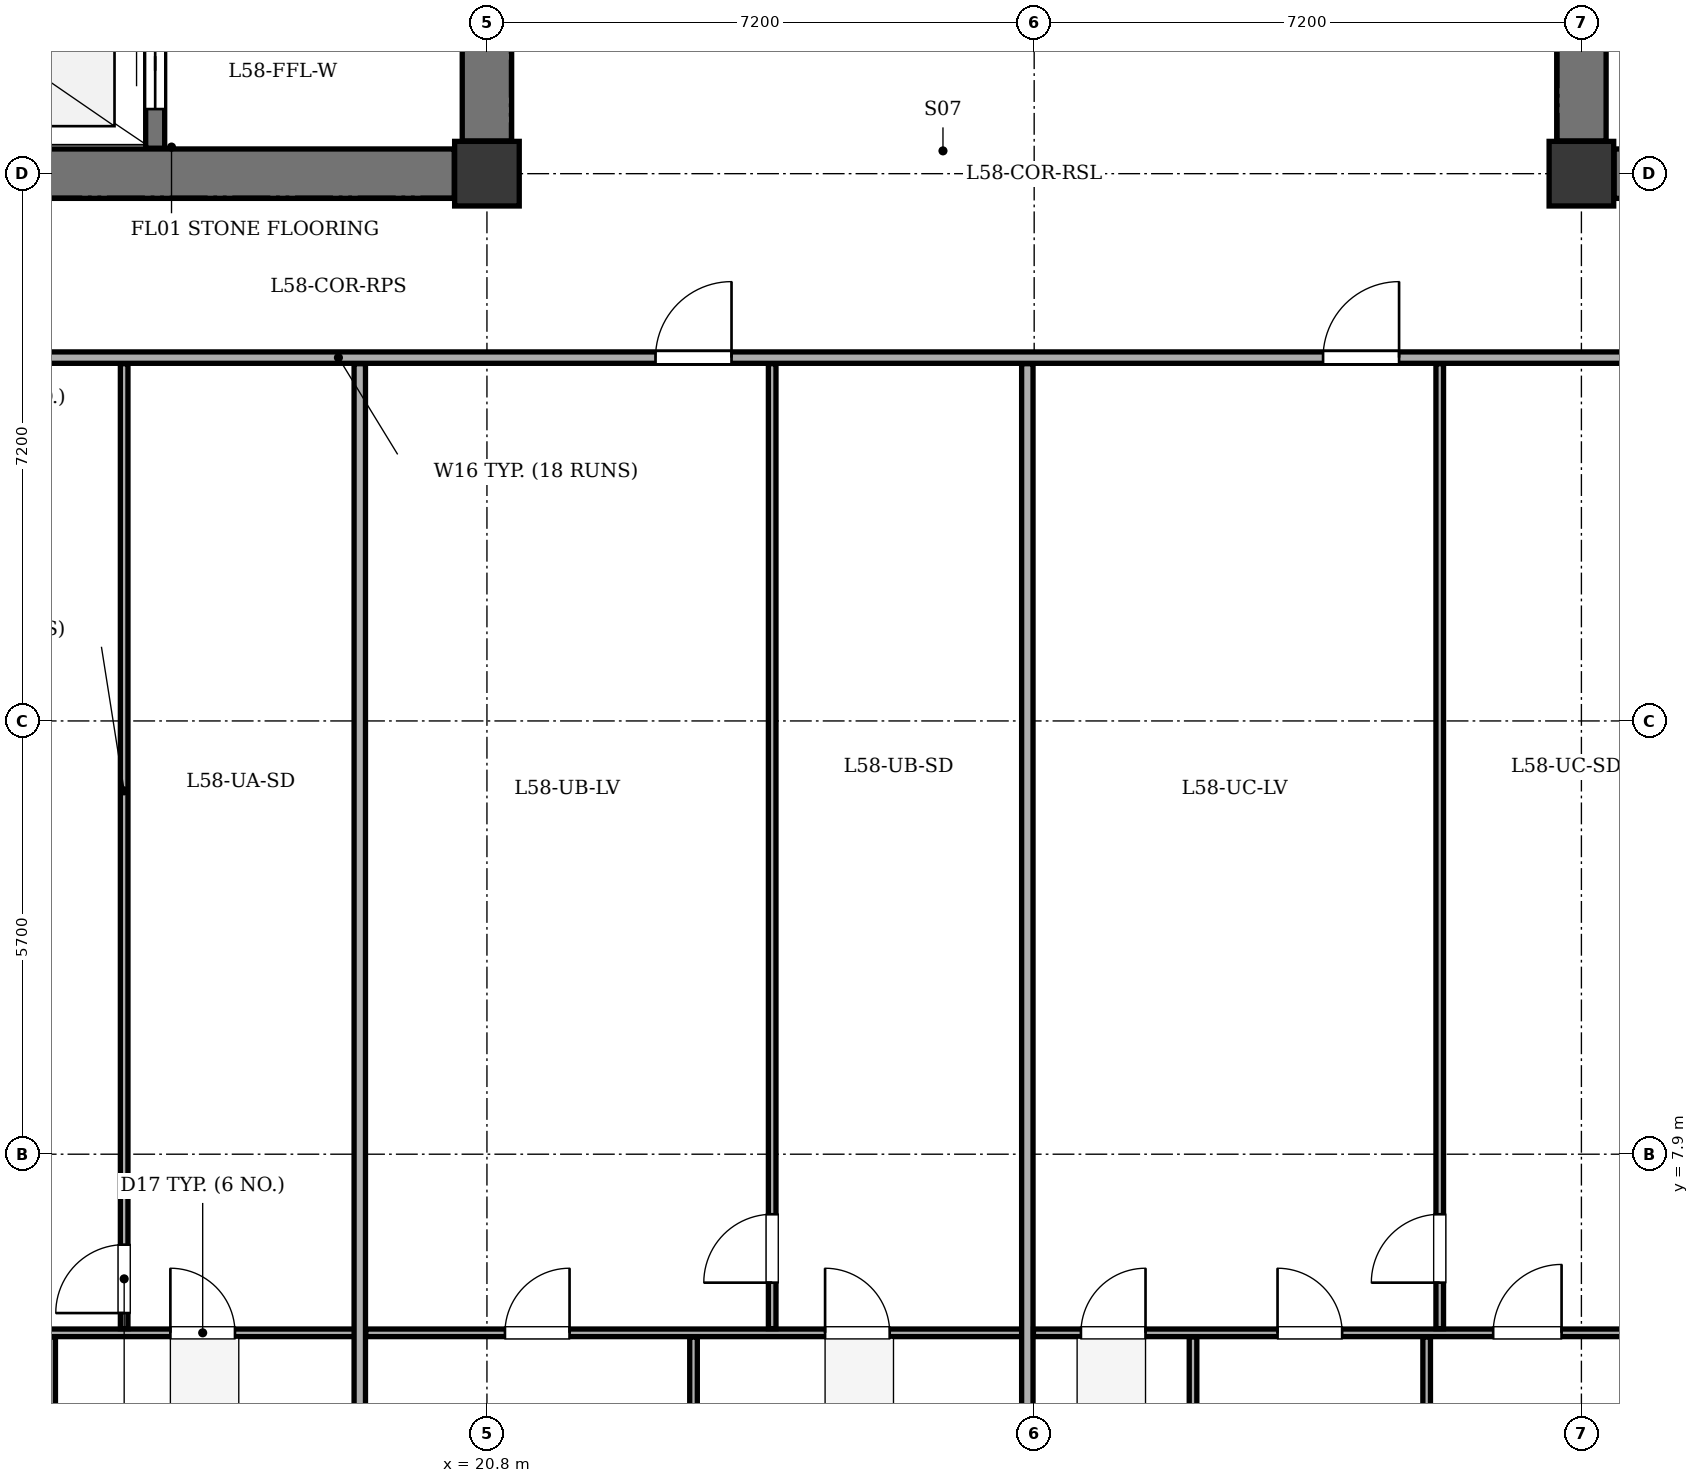
"""IFC4 building model, lengths in metres.
Left out: names, types, materials, properties, quantities, classifications, styles, units other than length and angle.
Written with IfcOpenShell. Run it as: python <this file> out.ifc"""

import sys

from ifc_helpers import new_model, si_unit, direction, frame, frame_2d, origin, origin_2d, place, context, subcontext, project, spatial, rectangle, extrude, element, fill, save


model = new_model("IFC4")
c1 = context("Model", 3, precision=1e-05, world=origin(), true_north=direction((0.0, 1.0)))
c2 = subcontext(c1, "Body", "Model", "MODEL_VIEW")
j1 = project(units=[si_unit("LENGTHUNIT", "METRE"), si_unit("PLANEANGLEUNIT", "RADIAN")], contexts=[c1])
p1 = place(None, origin())
s1 = spatial("IfcSite", under=j1, at=p1, CompositionType="ELEMENT")
p2 = place(p1, origin())
s2 = spatial("IfcBuilding", under=s1, at=p2, CompositionType="ELEMENT")
p3 = place(p2, frame((0.0, 0.0, 224.5)))
s3 = spatial("IfcBuildingStorey", under=s2, at=p3, CompositionType="ELEMENT", Elevation=224.5)
for number, where, z_axis, x_axis in (
    (1, (20.8, 20.8, 0.0), (0.0, 0.0, 1.0), (1.0, 0.0, 0.0)),
    (2, (35.2, 20.8, 0.0), (0.0, 0.0, 1.0), (1.0, 0.0, 0.0)),
):
    element("IfcColumn", number, at=place(p3, frame(where, z_axis=z_axis, x_axis=x_axis)), inside=s3, PredefinedType="COLUMN", context=c2, shape_type="SweptSolid", body=[
        extrude(rectangle(XDim=0.85, YDim=0.85, at=origin_2d()), origin(), (0.0, 0.0, 1.0), 3.4),
    ])
p4 = place(p3, frame((13.23, 20.8, 0.0), z_axis=(0.0, 0.0, 1.0), x_axis=(1.0, 0.0, 0.0)))
e3 = element("IfcWall", 3, at=p4, inside=s3, PredefinedType="SHEAR", context=c2, shape_type="SweptSolid", body=[
    extrude(rectangle(XDim=7.14, YDim=0.65, at=frame_2d((3.57, 0.0))), origin(), (0.0, 0.0, 1.0), 2.95),
])
p5 = place(p3, frame((20.8, 21.23, 0.0), z_axis=(0.0, 0.0, 1.0), x_axis=(0.0, 1.0, 0.0)))
e4 = element("IfcWall", 4, at=p5, inside=s3, PredefinedType="SHEAR", context=c2, shape_type="SweptSolid", body=[
    extrude(rectangle(XDim=3.82, YDim=0.65, at=frame_2d((1.91, 0.0))), origin(), (0.0, 0.0, 1.0), 2.95),
])
p6 = place(p5, frame((1.37, 0.0, 0.0)))
e5 = element("IfcOpeningElement", 5, at=p6, cuts=e4, PredefinedType="OPENING", context=c2, shape_type="SweptSolid", body=[
    extrude(rectangle(XDim=1.2, YDim=2.15, at=frame_2d((0.6, 1.075))), frame((0.0, 0.335, 0.0), z_axis=(0.0, -1.0, 0.0), x_axis=(1.0, 0.0, 0.0)), (0.0, 0.0, 1.0), 0.67),
])
p7 = place(p3, frame((16.435, 21.135, 0.0), z_axis=(0.0, 0.0, 1.0), x_axis=(0.0, 1.0, 0.0)))
e6 = element("IfcWall", 6, at=p7, inside=s3, PredefinedType="SHEAR", context=c2, shape_type="SweptSolid", body=[
    extrude(rectangle(XDim=12.13, YDim=0.25, at=frame_2d((6.065, 0.0))), origin(), (0.0, 0.0, 1.0), 2.95),
])
p8 = place(p7, frame((0.515, 0.0, 0.0)))
e7 = element("IfcOpeningElement", 7, at=p8, cuts=e6, PredefinedType="OPENING", context=c2, shape_type="SweptSolid", body=[
    extrude(rectangle(XDim=1.2, YDim=2.15, at=frame_2d((0.6, 1.075))), frame((0.0, 0.135, 0.0), z_axis=(0.0, -1.0, 0.0), x_axis=(1.0, 0.0, 0.0)), (0.0, 0.0, 1.0), 0.27),
])
p9 = place(p7, frame((2.665, 0.0, 0.0)))
e8 = element("IfcOpeningElement", 8, at=p9, cuts=e6, PredefinedType="OPENING", context=c2, shape_type="SweptSolid", body=[
    extrude(rectangle(XDim=1.15, YDim=2.15, at=frame_2d((0.575, 1.075))), frame((0.0, 0.135, 0.0), z_axis=(0.0, -1.0, 0.0), x_axis=(1.0, 0.0, 0.0)), (0.0, 0.0, 1.0), 0.27),
])
p10 = place(p3, frame((35.63, 20.8, 0.0), z_axis=(0.0, 0.0, 1.0), x_axis=(1.0, 0.0, 0.0)))
e9 = element("IfcWall", 9, at=p10, inside=s3, PredefinedType="SHEAR", context=c2, shape_type="SweptSolid", body=[
    extrude(rectangle(XDim=7.14, YDim=0.65, at=frame_2d((3.57, 0.0))), origin(), (0.0, 0.0, 1.0), 2.95),
])
p11 = place(p3, frame((35.2, 21.23, 0.0), z_axis=(0.0, 0.0, 1.0), x_axis=(0.0, 1.0, 0.0)))
e10 = element("IfcWall", 10, at=p11, inside=s3, PredefinedType="SHEAR", context=c2, shape_type="SweptSolid", body=[
    extrude(rectangle(XDim=3.82, YDim=0.65, at=frame_2d((1.91, 0.0))), origin(), (0.0, 0.0, 1.0), 2.95),
])
p12 = place(p11, frame((1.37, 0.0, 0.0)))
e11 = element("IfcOpeningElement", 11, at=p12, cuts=e10, PredefinedType="OPENING", context=c2, shape_type="SweptSolid", body=[
    extrude(rectangle(XDim=1.2, YDim=2.15, at=frame_2d((0.6, 1.075))), frame((0.0, 0.335, 0.0), z_axis=(0.0, -1.0, 0.0), x_axis=(1.0, 0.0, 0.0)), (0.0, 0.0, 1.0), 0.67),
])
p13 = place(p3, frame((10.9, 18.38, 0.0), z_axis=(0.0, 0.0, 1.0), x_axis=(1.0, 0.0, 0.0)))
e12 = element("IfcWall", 12, at=p13, inside=s3, PredefinedType="PARTITIONING", context=c2, shape_type="SweptSolid", body=[
    extrude(rectangle(XDim=34.02, YDim=0.15, at=frame_2d((17.01, 0.0))), origin(), (0.0, 0.0, 1.0), 2.95),
])
p14 = place(p13, frame((2.774, 0.0, 0.0)))
e13 = element("IfcOpeningElement", 13, at=p14, cuts=e12, PredefinedType="OPENING", context=c2, shape_type="SweptSolid", body=[
    extrude(rectangle(XDim=1.0, YDim=2.1, at=frame_2d((0.5, 1.05))), frame((0.0, 0.085, 0.0), z_axis=(0.0, -1.0, 0.0), x_axis=(1.0, 0.0, 0.0)), (0.0, 0.0, 1.0), 0.17),
])
p15 = place(p13, frame((12.118, 0.0, 0.0)))
e14 = element("IfcOpeningElement", 14, at=p15, cuts=e12, PredefinedType="OPENING", context=c2, shape_type="SweptSolid", body=[
    extrude(rectangle(XDim=1.0, YDim=2.1, at=frame_2d((0.5, 1.05))), frame((0.0, 0.085, 0.0), z_axis=(0.0, -1.0, 0.0), x_axis=(1.0, 0.0, 0.0)), (0.0, 0.0, 1.0), 0.17),
])
p16 = place(p13, frame((20.901, 0.0, 0.0)))
e15 = element("IfcOpeningElement", 15, at=p16, cuts=e12, PredefinedType="OPENING", context=c2, shape_type="SweptSolid", body=[
    extrude(rectangle(XDim=1.0, YDim=2.1, at=frame_2d((0.5, 1.05))), frame((0.0, 0.085, 0.0), z_axis=(0.0, -1.0, 0.0), x_axis=(1.0, 0.0, 0.0)), (0.0, 0.0, 1.0), 0.17),
])
p17 = place(p13, frame((29.346, 0.0, 0.0)))
e16 = element("IfcOpeningElement", 16, at=p17, cuts=e12, PredefinedType="OPENING", context=c2, shape_type="SweptSolid", body=[
    extrude(rectangle(XDim=1.0, YDim=2.1, at=frame_2d((0.5, 1.05))), frame((0.0, 0.085, 0.0), z_axis=(0.0, -1.0, 0.0), x_axis=(1.0, 0.0, 0.0)), (0.0, 0.0, 1.0), 0.17),
])
p18 = place(p3, frame((11.1, 5.55, 0.0), z_axis=(0.0, 0.0, 1.0), x_axis=(1.0, 0.0, 0.0)))
e17 = element("IfcWall", 17, at=p18, inside=s3, PredefinedType="PARTITIONING", context=c2, shape_type="SweptSolid", body=[
    extrude(rectangle(XDim=8.067, YDim=0.1, at=frame_2d((4.033, 0.0))), origin(), (0.0, 0.0, 1.0), 2.95),
])
p19 = place(p18, frame((1.562, 0.0, 0.0)))
e18 = element("IfcOpeningElement", 18, at=p19, cuts=e17, PredefinedType="OPENING", context=c2, shape_type="SweptSolid", body=[
    extrude(rectangle(XDim=0.85, YDim=2.05, at=frame_2d((0.425, 1.025))), frame((0.0, 0.06, 0.0), z_axis=(0.0, -1.0, 0.0), x_axis=(1.0, 0.0, 0.0)), (0.0, 0.0, 1.0), 0.12),
])
p20 = place(p18, frame((5.535, 0.0, 0.0)))
e19 = element("IfcOpeningElement", 19, at=p20, cuts=e17, PredefinedType="OPENING", context=c2, shape_type="SweptSolid", body=[
    extrude(rectangle(XDim=0.85, YDim=2.05, at=frame_2d((0.425, 1.025))), frame((0.0, 0.06, 0.0), z_axis=(0.0, -1.0, 0.0), x_axis=(1.0, 0.0, 0.0)), (0.0, 0.0, 1.0), 0.12),
])
p21 = place(p3, frame((16.027, 5.605, 0.0), z_axis=(0.0, 0.0, 1.0), x_axis=(0.0, 1.0, 0.0)))
e20 = element("IfcWall", 20, at=p21, inside=s3, PredefinedType="PARTITIONING", context=c2, shape_type="SweptSolid", body=[
    extrude(rectangle(XDim=12.695, YDim=0.1, at=frame_2d((6.348, 0.0))), origin(), (0.0, 0.0, 1.0), 2.95),
])
p22 = place(p21, frame((0.205, 0.0, 0.0)))
e21 = element("IfcOpeningElement", 21, at=p22, cuts=e20, PredefinedType="OPENING", context=c2, shape_type="SweptSolid", body=[
    extrude(rectangle(XDim=0.9, YDim=2.05, at=frame_2d((0.45, 1.025))), frame((0.0, 0.06, 0.0), z_axis=(0.0, -1.0, 0.0), x_axis=(1.0, 0.0, 0.0)), (0.0, 0.0, 1.0), 0.12),
])
p23 = place(p3, frame((15.073, 3.045, 0.0), z_axis=(0.0, 0.0, 1.0), x_axis=(0.0, 1.0, 0.0)))
e22 = element("IfcWall", 22, at=p23, inside=s3, PredefinedType="PARTITIONING", context=c2, shape_type="SweptSolid", body=[
    extrude(rectangle(XDim=2.45, YDim=0.1, at=frame_2d((1.225, 0.0))), origin(), (0.0, 0.0, 1.0), 1.535),
])
p24 = place(p3, frame((19.127, 3.045, 0.0), z_axis=(0.0, 0.0, 1.0), x_axis=(0.0, 1.0, 0.0)))
e23 = element("IfcWall", 23, at=p24, inside=s3, PredefinedType="PARTITIONING", context=c2, shape_type="SweptSolid", body=[
    extrude(rectangle(XDim=15.255, YDim=0.15, at=frame_2d((7.627, 0.0))), origin(), (0.0, 0.0, 1.0), 2.95),
])
p25 = place(p3, frame((19.207, 5.55, 0.0), z_axis=(0.0, 0.0, 1.0), x_axis=(1.0, 0.0, 0.0)))
e24 = element("IfcWall", 24, at=p25, inside=s3, PredefinedType="PARTITIONING", context=c2, shape_type="SweptSolid", body=[
    extrude(rectangle(XDim=8.743, YDim=0.1, at=frame_2d((4.372, 0.0))), origin(), (0.0, 0.0, 1.0), 2.95),
])
p26 = place(p25, frame((1.83, 0.0, 0.0)))
e25 = element("IfcOpeningElement", 25, at=p26, cuts=e24, PredefinedType="OPENING", context=c2, shape_type="SweptSolid", body=[
    extrude(rectangle(XDim=0.85, YDim=2.05, at=frame_2d((0.425, 1.025))), frame((0.0, 0.06, 0.0), z_axis=(0.0, -1.0, 0.0), x_axis=(1.0, 0.0, 0.0)), (0.0, 0.0, 1.0), 0.12),
])
p27 = place(p25, frame((6.042, 0.0, 0.0)))
e26 = element("IfcOpeningElement", 26, at=p27, cuts=e24, PredefinedType="OPENING", context=c2, shape_type="SweptSolid", body=[
    extrude(rectangle(XDim=0.85, YDim=2.05, at=frame_2d((0.425, 1.025))), frame((0.0, 0.06, 0.0), z_axis=(0.0, -1.0, 0.0), x_axis=(1.0, 0.0, 0.0)), (0.0, 0.0, 1.0), 0.12),
])
p28 = place(p3, frame((24.553, 5.605, 0.0), z_axis=(0.0, 0.0, 1.0), x_axis=(0.0, 1.0, 0.0)))
e27 = element("IfcWall", 27, at=p28, inside=s3, PredefinedType="PARTITIONING", context=c2, shape_type="SweptSolid", body=[
    extrude(rectangle(XDim=12.695, YDim=0.1, at=frame_2d((6.348, 0.0))), origin(), (0.0, 0.0, 1.0), 2.95),
])
p29 = place(p28, frame((0.605, 0.0, 0.0)))
e28 = element("IfcOpeningElement", 28, at=p29, cuts=e27, PredefinedType="OPENING", context=c2, shape_type="SweptSolid", body=[
    extrude(rectangle(XDim=0.9, YDim=2.05, at=frame_2d((0.45, 1.025))), frame((0.0, 0.06, 0.0), z_axis=(0.0, -1.0, 0.0), x_axis=(1.0, 0.0, 0.0)), (0.0, 0.0, 1.0), 0.12),
])
p30 = place(p3, frame((23.518, 3.045, 0.0), z_axis=(0.0, 0.0, 1.0), x_axis=(0.0, 1.0, 0.0)))
e29 = element("IfcWall", 29, at=p30, inside=s3, PredefinedType="PARTITIONING", context=c2, shape_type="SweptSolid", body=[
    extrude(rectangle(XDim=2.45, YDim=0.1, at=frame_2d((1.225, 0.0))), origin(), (0.0, 0.0, 1.0), 2.95),
])
p31 = place(p3, frame((27.91, 3.045, 0.0), z_axis=(0.0, 0.0, 1.0), x_axis=(0.0, 1.0, 0.0)))
e30 = element("IfcWall", 30, at=p31, inside=s3, PredefinedType="PARTITIONING", context=c2, shape_type="SweptSolid", body=[
    extrude(rectangle(XDim=15.255, YDim=0.15, at=frame_2d((7.627, 0.0))), origin(), (0.0, 0.0, 1.0), 2.135),
])
p32 = place(p3, frame((27.99, 5.55, 0.0), z_axis=(0.0, 0.0, 1.0), x_axis=(1.0, 0.0, 0.0)))
e31 = element("IfcWall", 31, at=p32, inside=s3, PredefinedType="PARTITIONING", context=c2, shape_type="SweptSolid", body=[
    extrude(rectangle(XDim=8.743, YDim=0.1, at=frame_2d((4.372, 0.0))), origin(), (0.0, 0.0, 1.0), 2.95),
])
p33 = place(p32, frame((0.625, 0.0, 0.0)))
e32 = element("IfcOpeningElement", 32, at=p33, cuts=e31, PredefinedType="OPENING", context=c2, shape_type="SweptSolid", body=[
    extrude(rectangle(XDim=0.85, YDim=2.05, at=frame_2d((0.425, 1.025))), frame((0.0, 0.06, 0.0), z_axis=(0.0, -1.0, 0.0), x_axis=(1.0, 0.0, 0.0)), (0.0, 0.0, 1.0), 0.12),
])
p34 = place(p32, frame((3.212, 0.0, 0.0)))
e33 = element("IfcOpeningElement", 33, at=p34, cuts=e31, PredefinedType="OPENING", context=c2, shape_type="SweptSolid", body=[
    extrude(rectangle(XDim=0.85, YDim=2.05, at=frame_2d((0.425, 1.025))), frame((0.0, 0.06, 0.0), z_axis=(0.0, -1.0, 0.0), x_axis=(1.0, 0.0, 0.0)), (0.0, 0.0, 1.0), 0.12),
])
p35 = place(p32, frame((6.049, 0.0, 0.0)))
e34 = element("IfcOpeningElement", 34, at=p35, cuts=e31, PredefinedType="OPENING", context=c2, shape_type="SweptSolid", body=[
    extrude(rectangle(XDim=0.9, YDim=2.05, at=frame_2d((0.45, 1.025))), frame((0.0, 0.06, 0.0), z_axis=(0.0, -1.0, 0.0), x_axis=(1.0, 0.0, 0.0)), (0.0, 0.0, 1.0), 0.12),
])
p36 = place(p3, frame((33.336, 5.605, 0.0), z_axis=(0.0, 0.0, 1.0), x_axis=(0.0, 1.0, 0.0)))
e35 = element("IfcWall", 35, at=p36, inside=s3, PredefinedType="PARTITIONING", context=c2, shape_type="SweptSolid", body=[
    extrude(rectangle(XDim=12.695, YDim=0.1, at=frame_2d((6.348, 0.0))), origin(), (0.0, 0.0, 1.0), 2.95),
])
p37 = place(p36, frame((0.605, 0.0, 0.0)))
e36 = element("IfcOpeningElement", 36, at=p37, cuts=e35, PredefinedType="OPENING", context=c2, shape_type="SweptSolid", body=[
    extrude(rectangle(XDim=0.9, YDim=2.05, at=frame_2d((0.45, 1.025))), frame((0.0, 0.06, 0.0), z_axis=(0.0, -1.0, 0.0), x_axis=(1.0, 0.0, 0.0)), (0.0, 0.0, 1.0), 0.12),
])
for number, where, z_axis, x_axis in (
    (37, (30.09, 3.045, 0.0), (0.0, 0.0, 1.0), (0.0, 1.0, 0.0)),
    (38, (33.164, 3.045, 0.0), (0.0, 0.0, 1.0), (0.0, 1.0, 0.0)),
):
    element("IfcWall", number, at=place(p3, frame(where, z_axis=z_axis, x_axis=x_axis)), inside=s3, PredefinedType="PARTITIONING", context=c2, shape_type="SweptSolid", body=[
        extrude(rectangle(XDim=2.45, YDim=0.1, at=frame_2d((1.225, 0.0))), origin(), (0.0, 0.0, 1.0), 2.95),
    ])
p38 = place(p8, origin())
e39 = element("IfcDoor", 39, at=p38, inside=s3, OperationType="DOUBLE_DOOR_SLIDING", PredefinedType="DOOR", context=c2, shape_type="SweptSolid", body=[
    extrude(rectangle(XDim=1.2, YDim=2.15, at=frame_2d((0.6, 1.075))), frame((0.0, 0.025, 0.0), z_axis=(0.0, -1.0, 0.0), x_axis=(1.0, 0.0, 0.0)), (0.0, 0.0, 1.0), 0.05),
])
fill(e7, e39)
p39 = place(p15, origin())
e40 = element("IfcDoor", 40, at=p39, inside=s3, OperationType="SINGLE_SWING_RIGHT", PredefinedType="DOOR", context=c2, shape_type="SweptSolid", body=[
    extrude(rectangle(XDim=1.0, YDim=2.1, at=frame_2d((0.5, 1.05))), frame((0.0, 0.025, 0.0), z_axis=(0.0, -1.0, 0.0), x_axis=(1.0, 0.0, 0.0)), (0.0, 0.0, 1.0), 0.05),
])
fill(e14, e40)
p40 = place(p16, origin())
e41 = element("IfcDoor", 41, at=p40, inside=s3, OperationType="SINGLE_SWING_RIGHT", PredefinedType="DOOR", context=c2, shape_type="SweptSolid", body=[
    extrude(rectangle(XDim=1.0, YDim=2.1, at=frame_2d((0.5, 1.05))), frame((0.0, 0.025, 0.0), z_axis=(0.0, -1.0, 0.0), x_axis=(1.0, 0.0, 0.0)), (0.0, 0.0, 1.0), 0.05),
])
fill(e15, e41)
p41 = place(p22, origin())
e42 = element("IfcDoor", 42, at=p41, inside=s3, OperationType="SINGLE_SWING_LEFT", PredefinedType="DOOR", context=c2, shape_type="SweptSolid", body=[
    extrude(rectangle(XDim=0.9, YDim=2.05, at=frame_2d((0.45, 1.025))), frame((0.0, 0.025, 0.0), z_axis=(0.0, -1.0, 0.0), x_axis=(1.0, 0.0, 0.0)), (0.0, 0.0, 1.0), 0.05),
])
fill(e21, e42)
p42 = place(p20, origin())
e43 = element("IfcDoor", 43, at=p42, inside=s3, OperationType="SINGLE_SWING_LEFT", PredefinedType="DOOR", context=c2, shape_type="SweptSolid", body=[
    extrude(rectangle(XDim=0.85, YDim=2.05, at=frame_2d((0.425, 1.025))), frame((0.0, 0.025, 0.0), z_axis=(0.0, -1.0, 0.0), x_axis=(1.0, 0.0, 0.0)), (0.0, 0.0, 1.0), 0.05),
])
fill(e19, e43)
p43 = place(p29, origin())
e44 = element("IfcDoor", 44, at=p43, inside=s3, OperationType="SINGLE_SWING_LEFT", PredefinedType="DOOR", context=c2, shape_type="SweptSolid", body=[
    extrude(rectangle(XDim=0.9, YDim=2.05, at=frame_2d((0.45, 1.025))), frame((0.0, 0.025, 0.0), z_axis=(0.0, -1.0, 0.0), x_axis=(1.0, 0.0, 0.0)), (0.0, 0.0, 1.0), 0.05),
])
fill(e28, e44)
p44 = place(p26, origin())
e45 = element("IfcDoor", 45, at=p44, inside=s3, OperationType="SINGLE_SWING_RIGHT", PredefinedType="DOOR", context=c2, shape_type="SweptSolid", body=[
    extrude(rectangle(XDim=0.85, YDim=2.05, at=frame_2d((0.425, 1.025))), frame((0.0, 0.025, 0.0), z_axis=(0.0, -1.0, 0.0), x_axis=(1.0, 0.0, 0.0)), (0.0, 0.0, 1.0), 0.05),
])
fill(e25, e45)
p45 = place(p27, origin())
e46 = element("IfcDoor", 46, at=p45, inside=s3, OperationType="SINGLE_SWING_LEFT", PredefinedType="DOOR", context=c2, shape_type="SweptSolid", body=[
    extrude(rectangle(XDim=0.85, YDim=2.05, at=frame_2d((0.425, 1.025))), frame((0.0, 0.025, 0.0), z_axis=(0.0, -1.0, 0.0), x_axis=(1.0, 0.0, 0.0)), (0.0, 0.0, 1.0), 0.05),
])
fill(e26, e46)
p46 = place(p37, origin())
e47 = element("IfcDoor", 47, at=p46, inside=s3, OperationType="SINGLE_SWING_LEFT", PredefinedType="DOOR", context=c2, shape_type="SweptSolid", body=[
    extrude(rectangle(XDim=0.9, YDim=2.05, at=frame_2d((0.45, 1.025))), frame((0.0, 0.025, 0.0), z_axis=(0.0, -1.0, 0.0), x_axis=(1.0, 0.0, 0.0)), (0.0, 0.0, 1.0), 0.05),
])
fill(e36, e47)
p47 = place(p33, origin())
e48 = element("IfcDoor", 48, at=p47, inside=s3, OperationType="SINGLE_SWING_RIGHT", PredefinedType="DOOR", context=c2, shape_type="SweptSolid", body=[
    extrude(rectangle(XDim=0.85, YDim=2.05, at=frame_2d((0.425, 1.025))), frame((0.0, 0.025, 0.0), z_axis=(0.0, -1.0, 0.0), x_axis=(1.0, 0.0, 0.0)), (0.0, 0.0, 1.0), 0.05),
])
fill(e32, e48)
p48 = place(p34, origin())
e49 = element("IfcDoor", 49, at=p48, inside=s3, OperationType="SINGLE_SWING_LEFT", PredefinedType="DOOR", context=c2, shape_type="SweptSolid", body=[
    extrude(rectangle(XDim=0.85, YDim=2.05, at=frame_2d((0.425, 1.025))), frame((0.0, 0.025, 0.0), z_axis=(0.0, -1.0, 0.0), x_axis=(1.0, 0.0, 0.0)), (0.0, 0.0, 1.0), 0.05),
])
fill(e33, e49)
p49 = place(p35, origin())
e50 = element("IfcDoor", 50, at=p49, inside=s3, OperationType="SINGLE_SWING_RIGHT", PredefinedType="DOOR", context=c2, shape_type="SweptSolid", body=[
    extrude(rectangle(XDim=0.9, YDim=2.05, at=frame_2d((0.45, 1.025))), frame((0.0, 0.025, 0.0), z_axis=(0.0, -1.0, 0.0), x_axis=(1.0, 0.0, 0.0)), (0.0, 0.0, 1.0), 0.05),
])
fill(e34, e50)
save(model, sys.argv[1])
